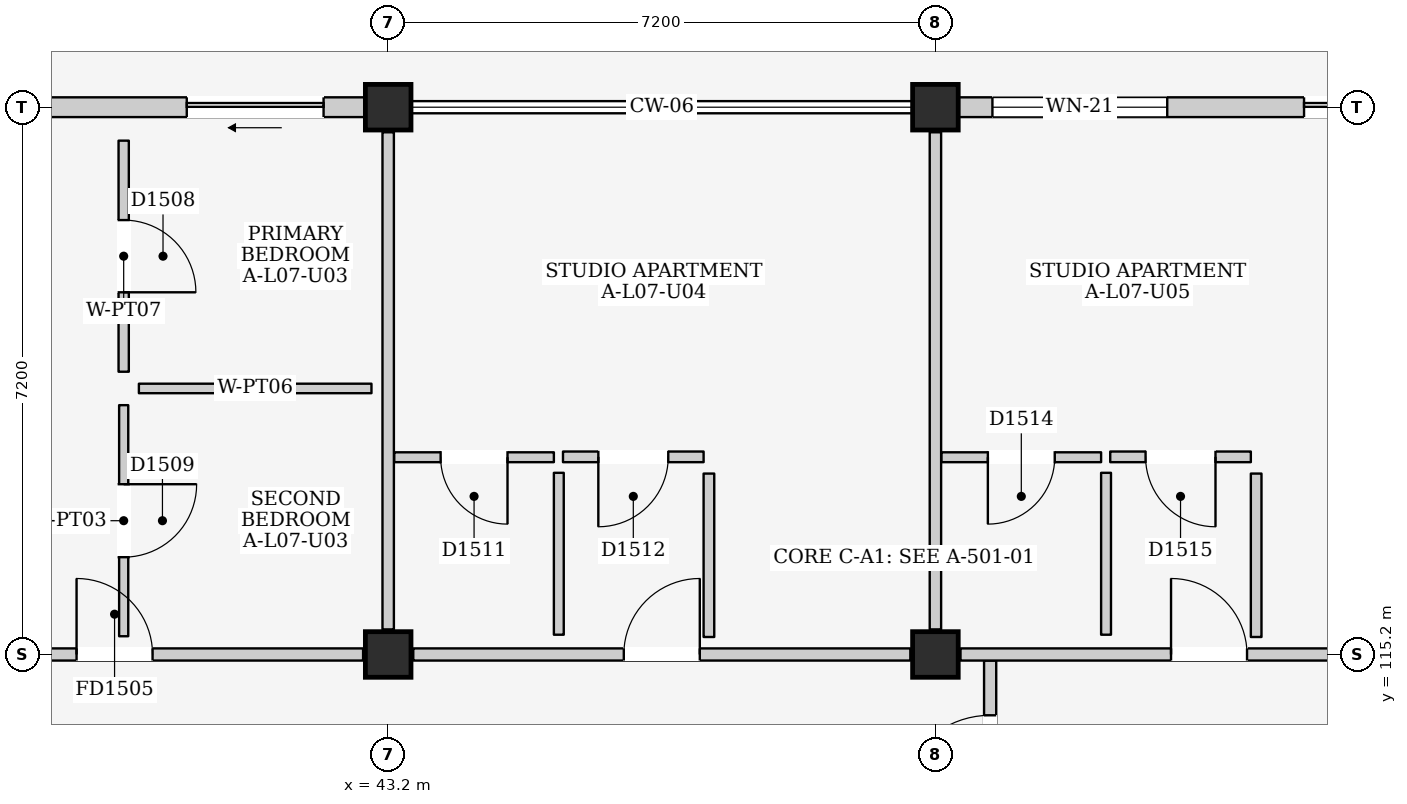
"""IFC4 building model, lengths in metres.
Left out: names, types, materials, properties, quantities, classifications, styles, units other than length and angle.
Written with IfcOpenShell. Run it as: python <this file> out.ifc"""

import sys

from ifc_helpers import new_model, si_unit, direction, frame, frame_2d, origin, origin_2d, place, context, subcontext, project, spatial, rectangle, extrude, element, fill, save


model = new_model("IFC4")
c1 = context("Model", 3, precision=1e-05, world=origin(), true_north=direction((0.0, 1.0)))
c2 = subcontext(c1, "Body", "Model", "MODEL_VIEW")
j1 = project(units=[si_unit("LENGTHUNIT", "METRE"), si_unit("PLANEANGLEUNIT", "RADIAN")], contexts=[c1])
p1 = place(None, origin())
s1 = spatial("IfcSite", under=j1, at=p1, CompositionType="ELEMENT")
p2 = place(p1, origin())
s2 = spatial("IfcBuilding", under=s1, at=p2, CompositionType="ELEMENT")
p3 = place(p2, frame((0.0, 0.0, 25.1)))
s3 = spatial("IfcBuildingStorey", under=s2, at=p3, CompositionType="ELEMENT", Elevation=25.1)
for number, where, z_axis, x_axis in (
    (1, (43.2, 115.2, 0.0), (0.0, 0.0, 1.0), (1.0, 0.0, 0.0)),
    (2, (43.2, 122.4, 0.0), (0.0, 0.0, 1.0), (1.0, 0.0, 0.0)),
    (3, (50.4, 115.2, 0.0), (0.0, 0.0, 1.0), (1.0, 0.0, 0.0)),
    (4, (50.4, 122.4, 0.0), (0.0, 0.0, 1.0), (1.0, 0.0, 0.0)),
):
    element("IfcColumn", number, at=place(p3, frame(where, z_axis=z_axis, x_axis=x_axis)), inside=s3, PredefinedType="COLUMN", context=c2, shape_type="SweptSolid", body=[
        extrude(rectangle(XDim=0.6, YDim=0.6, at=origin_2d()), origin(), (0.0, 0.0, 1.0), 3.2),
    ])
p4 = place(p3, frame((36.3, 122.4, 0.0), z_axis=(0.0, 0.0, 1.0), x_axis=(1.0, 0.0, 0.0)))
e5 = element("IfcWall", 5, at=p4, inside=s3, PredefinedType="ELEMENTEDWALL", context=c2, shape_type="SweptSolid", body=[
    extrude(rectangle(XDim=6.6, YDim=0.26, at=frame_2d((3.3, 0.0))), origin(), (0.0, 0.0, 1.0), 2.525),
])
p5 = place(p4, frame((4.25, 0.0, 0.0)))
e6 = element("IfcOpeningElement", 6, at=p5, cuts=e5, PredefinedType="OPENING", context=c2, shape_type="SweptSolid", body=[
    extrude(rectangle(XDim=1.8, YDim=2.12, at=frame_2d((0.9, 1.06))), frame((0.0, 0.145, 0.0), z_axis=(0.0, -1.0, 0.0), x_axis=(1.0, 0.0, 0.0)), (0.0, 0.0, 1.0), 0.29),
])
p6 = place(p4, frame((0.45, 0.0, 0.9)))
e7 = element("IfcOpeningElement", 7, at=p6, cuts=e5, PredefinedType="OPENING", context=c2, shape_type="SweptSolid", body=[
    extrude(rectangle(XDim=1.65, YDim=1.35, at=frame_2d((0.825, 0.675))), frame((0.0, 0.145, 0.0), z_axis=(0.0, -1.0, 0.0), x_axis=(1.0, 0.0, 0.0)), (0.0, 0.0, 1.0), 0.29),
])
p7 = place(p3, frame((50.7, 122.4, 0.0), z_axis=(0.0, 0.0, 1.0), x_axis=(1.0, 0.0, 0.0)))
e8 = element("IfcWall", 8, at=p7, inside=s3, PredefinedType="ELEMENTEDWALL", context=c2, shape_type="SweptSolid", body=[
    extrude(rectangle(XDim=6.6, YDim=0.26, at=frame_2d((3.3, 0.0))), origin(), (0.0, 0.0, 1.0), 2.525),
])
p8 = place(p7, frame((4.55, 0.0, 0.0)))
e9 = element("IfcOpeningElement", 9, at=p8, cuts=e8, PredefinedType="OPENING", context=c2, shape_type="SweptSolid", body=[
    extrude(rectangle(XDim=1.5, YDim=2.12, at=frame_2d((0.75, 1.06))), frame((0.0, 0.145, 0.0), z_axis=(0.0, -1.0, 0.0), x_axis=(1.0, 0.0, 0.0)), (0.0, 0.0, 1.0), 0.29),
])
p9 = place(p7, frame((0.45, 0.0, 0.815)))
e10 = element("IfcOpeningElement", 10, at=p9, cuts=e8, PredefinedType="OPENING", context=c2, shape_type="SweptSolid", body=[
    extrude(rectangle(XDim=2.3, YDim=1.6, at=frame_2d((1.15, 0.8))), frame((0.0, 0.145, 0.0), z_axis=(0.0, -1.0, 0.0), x_axis=(1.0, 0.0, 0.0)), (0.0, 0.0, 1.0), 0.29),
])
p10 = place(p3, frame((51.12, 111.1, 0.0), z_axis=(0.0, 0.0, 1.0), x_axis=(0.0, 1.0, 0.0)))
e11 = element("IfcWall", 11, at=p10, inside=s3, PredefinedType="PARTITIONING", context=c2, shape_type="SweptSolid", body=[
    extrude(rectangle(XDim=4.02, YDim=0.16, at=frame_2d((2.01, 0.0))), origin(), (0.0, 0.0, 1.0), 2.99),
])
p11 = place(p10, frame((2.1, 0.0, 0.0)))
e12 = element("IfcOpeningElement", 12, at=p11, cuts=e11, PredefinedType="OPENING", context=c2, shape_type="SweptSolid", body=[
    extrude(rectangle(XDim=1.2, YDim=2.2, at=frame_2d((0.6, 1.1))), frame((0.0, 0.095, 0.0), z_axis=(0.0, -1.0, 0.0), x_axis=(1.0, 0.0, 0.0)), (0.0, 0.0, 1.0), 0.19),
])
p12 = place(p3, frame((36.33, 115.2, 0.0), z_axis=(0.0, 0.0, 1.0), x_axis=(1.0, 0.0, 0.0)))
e13 = element("IfcWall", 13, at=p12, inside=s3, PredefinedType="PARTITIONING", context=c2, shape_type="SweptSolid", body=[
    extrude(rectangle(XDim=6.54, YDim=0.16, at=frame_2d((3.27, 0.0))), origin(), (0.0, 0.0, 1.0), 2.325),
])
p13 = place(p12, frame((2.77, 0.0, 0.0)))
e14 = element("IfcOpeningElement", 14, at=p13, cuts=e13, PredefinedType="OPENING", context=c2, shape_type="SweptSolid", body=[
    extrude(rectangle(XDim=1.0, YDim=2.15, at=frame_2d((0.5, 1.075))), frame((0.0, 0.095, 0.0), z_axis=(0.0, -1.0, 0.0), x_axis=(1.0, 0.0, 0.0)), (0.0, 0.0, 1.0), 0.19),
])
p14 = place(p3, frame((43.2, 115.53, 0.0), z_axis=(0.0, 0.0, 1.0), x_axis=(0.0, 1.0, 0.0)))
e15 = element("IfcWall", 15, at=p14, inside=s3, PredefinedType="PARTITIONING", context=c2, shape_type="SweptSolid", body=[
    extrude(rectangle(XDim=6.54, YDim=0.15, at=frame_2d((3.27, 0.0))), origin(), (0.0, 0.0, 1.0), 2.475),
])
p15 = place(p3, frame((39.72, 118.92, 0.0), z_axis=(0.0, 0.0, 1.0), x_axis=(0.0, 1.0, 0.0)))
e16 = element("IfcWall", 16, at=p15, inside=s3, PredefinedType="PARTITIONING", context=c2, shape_type="SweptSolid", body=[
    extrude(rectangle(XDim=3.04, YDim=0.135, at=frame_2d((1.52, 0.0))), origin(), (0.0, 0.0, 1.0), 2.99),
])
p16 = place(p15, frame((1.045, 0.0, 0.0)))
e17 = element("IfcOpeningElement", 17, at=p16, cuts=e16, PredefinedType="OPENING", context=c2, shape_type="SweptSolid", body=[
    extrude(rectangle(XDim=0.95, YDim=2.15, at=frame_2d((0.475, 1.075))), frame((0.0, 0.083, 0.0), z_axis=(0.0, -1.0, 0.0), x_axis=(1.0, 0.0, 0.0)), (0.0, 0.0, 1.0), 0.165),
])
p17 = place(p3, frame((39.92, 118.7, 0.0), z_axis=(0.0, 0.0, 1.0), x_axis=(1.0, 0.0, 0.0)))
e18 = element("IfcWall", 18, at=p17, inside=s3, PredefinedType="PARTITIONING", context=c2, shape_type="SweptSolid", body=[
    extrude(rectangle(XDim=3.06, YDim=0.125, at=frame_2d((1.53, 0.0))), origin(), (0.0, 0.0, 1.0), 2.99),
])
p18 = place(p3, frame((39.72, 115.44, 0.0), z_axis=(0.0, 0.0, 1.0), x_axis=(0.0, 1.0, 0.0)))
e19 = element("IfcWall", 19, at=p18, inside=s3, PredefinedType="PARTITIONING", context=c2, shape_type="SweptSolid", body=[
    extrude(rectangle(XDim=3.04, YDim=0.12, at=frame_2d((1.52, 0.0))), origin(), (0.0, 0.0, 1.0), 2.99),
])
p19 = place(p18, frame((1.04, 0.0, 0.0)))
e20 = element("IfcOpeningElement", 20, at=p19, cuts=e19, PredefinedType="OPENING", context=c2, shape_type="SweptSolid", body=[
    extrude(rectangle(XDim=0.96, YDim=2.15, at=frame_2d((0.48, 1.075))), frame((0.0, 0.075, 0.0), z_axis=(0.0, -1.0, 0.0), x_axis=(1.0, 0.0, 0.0)), (0.0, 0.0, 1.0), 0.15),
])
p20 = place(p3, frame((43.53, 115.2, 0.0), z_axis=(0.0, 0.0, 1.0), x_axis=(1.0, 0.0, 0.0)))
e21 = element("IfcWall", 21, at=p20, inside=s3, PredefinedType="PARTITIONING", context=c2, shape_type="SweptSolid", body=[
    extrude(rectangle(XDim=6.54, YDim=0.16, at=frame_2d((3.27, 0.0))), origin(), (0.0, 0.0, 1.0), 2.325),
])
p21 = place(p20, frame((2.77, 0.0, 0.0)))
e22 = element("IfcOpeningElement", 22, at=p21, cuts=e21, PredefinedType="OPENING", context=c2, shape_type="SweptSolid", body=[
    extrude(rectangle(XDim=1.0, YDim=2.15, at=frame_2d((0.5, 1.075))), frame((0.0, 0.095, 0.0), z_axis=(0.0, -1.0, 0.0), x_axis=(1.0, 0.0, 0.0)), (0.0, 0.0, 1.0), 0.19),
])
p22 = place(p3, frame((50.4, 115.53, 0.0), z_axis=(0.0, 0.0, 1.0), x_axis=(0.0, 1.0, 0.0)))
e23 = element("IfcWall", 23, at=p22, inside=s3, PredefinedType="PARTITIONING", context=c2, shape_type="SweptSolid", body=[
    extrude(rectangle(XDim=6.54, YDim=0.15, at=frame_2d((3.27, 0.0))), origin(), (0.0, 0.0, 1.0), 2.475),
])
p23 = place(p3, frame((43.28, 117.795, 0.0), z_axis=(0.0, 0.0, 1.0), x_axis=(1.0, 0.0, 0.0)))
e24 = element("IfcWall", 24, at=p23, inside=s3, PredefinedType="PARTITIONING", context=c2, shape_type="SweptSolid", body=[
    extrude(rectangle(XDim=2.1, YDim=0.13, at=frame_2d((1.05, 0.0))), origin(), (0.0, 0.0, 1.0), 2.99),
])
p24 = place(p23, frame((0.61, 0.0, 0.0)))
e25 = element("IfcOpeningElement", 25, at=p24, cuts=e24, PredefinedType="OPENING", context=c2, shape_type="SweptSolid", body=[
    extrude(rectangle(XDim=0.88, YDim=2.1, at=frame_2d((0.44, 1.05))), frame((0.0, 0.08, 0.0), z_axis=(0.0, -1.0, 0.0), x_axis=(1.0, 0.0, 0.0)), (0.0, 0.0, 1.0), 0.16),
])
p25 = place(p3, frame((45.445, 115.46, 0.0), z_axis=(0.0, 0.0, 1.0), x_axis=(0.0, 1.0, 0.0)))
e26 = element("IfcWall", 26, at=p25, inside=s3, PredefinedType="PARTITIONING", context=c2, shape_type="SweptSolid", body=[
    extrude(rectangle(XDim=2.13, YDim=0.13, at=frame_2d((1.065, 0.0))), origin(), (0.0, 0.0, 1.0), 2.99),
])
p26 = place(p3, frame((45.5, 117.8, 0.0), z_axis=(0.0, 0.0, 1.0), x_axis=(1.0, 0.0, 0.0)))
e27 = element("IfcWall", 27, at=p26, inside=s3, PredefinedType="PARTITIONING", context=c2, shape_type="SweptSolid", body=[
    extrude(rectangle(XDim=1.85, YDim=0.14, at=frame_2d((0.925, 0.0))), origin(), (0.0, 0.0, 1.0), 2.99),
])
p27 = place(p26, frame((0.465, 0.0, 0.0)))
e28 = element("IfcOpeningElement", 28, at=p27, cuts=e27, PredefinedType="OPENING", context=c2, shape_type="SweptSolid", body=[
    extrude(rectangle(XDim=0.92, YDim=2.1, at=frame_2d((0.46, 1.05))), frame((0.0, 0.085, 0.0), z_axis=(0.0, -1.0, 0.0), x_axis=(1.0, 0.0, 0.0)), (0.0, 0.0, 1.0), 0.17),
])
p28 = place(p3, frame((47.42, 115.43, 0.0), z_axis=(0.0, 0.0, 1.0), x_axis=(0.0, 1.0, 0.0)))
e29 = element("IfcWall", 29, at=p28, inside=s3, PredefinedType="PARTITIONING", context=c2, shape_type="SweptSolid", body=[
    extrude(rectangle(XDim=2.15, YDim=0.14, at=frame_2d((1.075, 0.0))), origin(), (0.0, 0.0, 1.0), 2.99),
])
p29 = place(p3, frame((50.73, 115.2, 0.0), z_axis=(0.0, 0.0, 1.0), x_axis=(1.0, 0.0, 0.0)))
e30 = element("IfcWall", 30, at=p29, inside=s3, PredefinedType="PARTITIONING", context=c2, shape_type="SweptSolid", body=[
    extrude(rectangle(XDim=6.54, YDim=0.16, at=frame_2d((3.27, 0.0))), origin(), (0.0, 0.0, 1.0), 2.325),
])
p30 = place(p29, frame((2.77, 0.0, 0.0)))
e31 = element("IfcOpeningElement", 31, at=p30, cuts=e30, PredefinedType="OPENING", context=c2, shape_type="SweptSolid", body=[
    extrude(rectangle(XDim=1.0, YDim=2.15, at=frame_2d((0.5, 1.075))), frame((0.0, 0.095, 0.0), z_axis=(0.0, -1.0, 0.0), x_axis=(1.0, 0.0, 0.0)), (0.0, 0.0, 1.0), 0.19),
])
p31 = place(p3, frame((50.48, 117.795, 0.0), z_axis=(0.0, 0.0, 1.0), x_axis=(1.0, 0.0, 0.0)))
e32 = element("IfcWall", 32, at=p31, inside=s3, PredefinedType="PARTITIONING", context=c2, shape_type="SweptSolid", body=[
    extrude(rectangle(XDim=2.1, YDim=0.13, at=frame_2d((1.05, 0.0))), origin(), (0.0, 0.0, 1.0), 2.99),
])
p32 = place(p31, frame((0.61, 0.0, 0.0)))
e33 = element("IfcOpeningElement", 33, at=p32, cuts=e32, PredefinedType="OPENING", context=c2, shape_type="SweptSolid", body=[
    extrude(rectangle(XDim=0.88, YDim=2.1, at=frame_2d((0.44, 1.05))), frame((0.0, 0.08, 0.0), z_axis=(0.0, -1.0, 0.0), x_axis=(1.0, 0.0, 0.0)), (0.0, 0.0, 1.0), 0.16),
])
p33 = place(p3, frame((52.645, 115.46, 0.0), z_axis=(0.0, 0.0, 1.0), x_axis=(0.0, 1.0, 0.0)))
e34 = element("IfcWall", 34, at=p33, inside=s3, PredefinedType="PARTITIONING", context=c2, shape_type="SweptSolid", body=[
    extrude(rectangle(XDim=2.13, YDim=0.13, at=frame_2d((1.065, 0.0))), origin(), (0.0, 0.0, 1.0), 2.99),
])
p34 = place(p3, frame((52.7, 117.8, 0.0), z_axis=(0.0, 0.0, 1.0), x_axis=(1.0, 0.0, 0.0)))
e35 = element("IfcWall", 35, at=p34, inside=s3, PredefinedType="PARTITIONING", context=c2, shape_type="SweptSolid", body=[
    extrude(rectangle(XDim=1.85, YDim=0.14, at=frame_2d((0.925, 0.0))), origin(), (0.0, 0.0, 1.0), 2.99),
])
p35 = place(p34, frame((0.465, 0.0, 0.0)))
e36 = element("IfcOpeningElement", 36, at=p35, cuts=e35, PredefinedType="OPENING", context=c2, shape_type="SweptSolid", body=[
    extrude(rectangle(XDim=0.92, YDim=2.1, at=frame_2d((0.46, 1.05))), frame((0.0, 0.085, 0.0), z_axis=(0.0, -1.0, 0.0), x_axis=(1.0, 0.0, 0.0)), (0.0, 0.0, 1.0), 0.17),
])
p36 = place(p3, frame((54.62, 115.43, 0.0), z_axis=(0.0, 0.0, 1.0), x_axis=(0.0, 1.0, 0.0)))
e37 = element("IfcWall", 37, at=p36, inside=s3, PredefinedType="PARTITIONING", context=c2, shape_type="SweptSolid", body=[
    extrude(rectangle(XDim=2.15, YDim=0.14, at=frame_2d((1.075, 0.0))), origin(), (0.0, 0.0, 1.0), 2.99),
])
p37 = place(p5, frame((1.8, 0.0, 0.0), z_axis=(0.0, 0.0, 1.0), x_axis=(-1.0, 0.0, 0.0)))
e38 = element("IfcDoor", 38, at=p37, inside=s3, OperationType="SLIDING_TO_LEFT", PredefinedType="DOOR", context=c2, shape_type="SweptSolid", body=[
    extrude(rectangle(XDim=1.8, YDim=2.12, at=frame_2d((0.9, 1.06))), frame((0.0, 0.025, 0.0), z_axis=(0.0, -1.0, 0.0), x_axis=(1.0, 0.0, 0.0)), (0.0, 0.0, 1.0), 0.05),
])
fill(e6, e38)
p38 = place(p8, frame((1.5, 0.0, 0.0), z_axis=(0.0, 0.0, 1.0), x_axis=(-1.0, 0.0, 0.0)))
e39 = element("IfcDoor", 39, at=p38, inside=s3, OperationType="SLIDING_TO_LEFT", PredefinedType="DOOR", context=c2, shape_type="SweptSolid", body=[
    extrude(rectangle(XDim=1.5, YDim=2.12, at=frame_2d((0.75, 1.06))), frame((0.0, 0.025, 0.0), z_axis=(0.0, -1.0, 0.0), x_axis=(1.0, 0.0, 0.0)), (0.0, 0.0, 1.0), 0.05),
])
fill(e9, e39)
p39 = place(p9, origin())
e40 = element("IfcWindow", 40, at=p39, inside=s3, PartitioningType="TRIPLE_PANEL_VERTICAL", PredefinedType="WINDOW", context=c2, shape_type="SweptSolid", body=[
    extrude(rectangle(XDim=2.3, YDim=1.6, at=frame_2d((1.15, 0.8))), frame((0.0, 0.03, 0.0), z_axis=(0.0, -1.0, 0.0), x_axis=(1.0, 0.0, 0.0)), (0.0, 0.0, 1.0), 0.06),
])
fill(e10, e40)
p40 = place(p11, origin())
e41 = element("IfcDoor", 41, at=p40, inside=s3, OperationType="SINGLE_SWING_LEFT", PredefinedType="DOOR", context=c2, shape_type="SweptSolid", body=[
    extrude(rectangle(XDim=1.2, YDim=2.2, at=frame_2d((0.6, 1.1))), frame((0.0, 0.025, 0.0), z_axis=(0.0, -1.0, 0.0), x_axis=(1.0, 0.0, 0.0)), (0.0, 0.0, 1.0), 0.05),
])
fill(e12, e41)
p41 = place(p13, origin())
e42 = element("IfcDoor", 42, at=p41, inside=s3, OperationType="SINGLE_SWING_LEFT", PredefinedType="DOOR", context=c2, shape_type="SweptSolid", body=[
    extrude(rectangle(XDim=1.0, YDim=2.15, at=frame_2d((0.5, 1.075))), frame((0.0, 0.025, 0.0), z_axis=(0.0, -1.0, 0.0), x_axis=(1.0, 0.0, 0.0)), (0.0, 0.0, 1.0), 0.05),
])
fill(e14, e42)
p42 = place(p16, frame((0.95, 0.0, 0.0), z_axis=(0.0, 0.0, 1.0), x_axis=(-1.0, 0.0, 0.0)))
e43 = element("IfcDoor", 43, at=p42, inside=s3, OperationType="SINGLE_SWING_RIGHT", PredefinedType="DOOR", context=c2, shape_type="SweptSolid", body=[
    extrude(rectangle(XDim=0.95, YDim=2.15, at=frame_2d((0.475, 1.075))), frame((0.0, 0.025, 0.0), z_axis=(0.0, -1.0, 0.0), x_axis=(1.0, 0.0, 0.0)), (0.0, 0.0, 1.0), 0.05),
])
fill(e17, e43)
p43 = place(p19, frame((0.96, 0.0, 0.0), z_axis=(0.0, 0.0, 1.0), x_axis=(-1.0, 0.0, 0.0)))
e44 = element("IfcDoor", 44, at=p43, inside=s3, OperationType="SINGLE_SWING_LEFT", PredefinedType="DOOR", context=c2, shape_type="SweptSolid", body=[
    extrude(rectangle(XDim=0.96, YDim=2.15, at=frame_2d((0.48, 1.075))), frame((0.0, 0.025, 0.0), z_axis=(0.0, -1.0, 0.0), x_axis=(1.0, 0.0, 0.0)), (0.0, 0.0, 1.0), 0.05),
])
fill(e20, e44)
p44 = place(p21, origin())
e45 = element("IfcDoor", 45, at=p44, inside=s3, OperationType="SINGLE_SWING_RIGHT", PredefinedType="DOOR", context=c2, shape_type="SweptSolid", body=[
    extrude(rectangle(XDim=1.0, YDim=2.15, at=frame_2d((0.5, 1.075))), frame((0.0, 0.025, 0.0), z_axis=(0.0, -1.0, 0.0), x_axis=(1.0, 0.0, 0.0)), (0.0, 0.0, 1.0), 0.05),
])
fill(e22, e45)
p45 = place(p24, frame((0.88, 0.0, 0.0), z_axis=(0.0, 0.0, 1.0), x_axis=(-1.0, 0.0, 0.0)))
e46 = element("IfcDoor", 46, at=p45, inside=s3, OperationType="SINGLE_SWING_LEFT", PredefinedType="DOOR", context=c2, shape_type="SweptSolid", body=[
    extrude(rectangle(XDim=0.88, YDim=2.1, at=frame_2d((0.44, 1.05))), frame((0.0, 0.025, 0.0), z_axis=(0.0, -1.0, 0.0), x_axis=(1.0, 0.0, 0.0)), (0.0, 0.0, 1.0), 0.05),
])
fill(e25, e46)
p46 = place(p27, frame((0.92, 0.0, 0.0), z_axis=(0.0, 0.0, 1.0), x_axis=(-1.0, 0.0, 0.0)))
e47 = element("IfcDoor", 47, at=p46, inside=s3, OperationType="SINGLE_SWING_RIGHT", PredefinedType="DOOR", context=c2, shape_type="SweptSolid", body=[
    extrude(rectangle(XDim=0.92, YDim=2.1, at=frame_2d((0.46, 1.05))), frame((0.0, 0.025, 0.0), z_axis=(0.0, -1.0, 0.0), x_axis=(1.0, 0.0, 0.0)), (0.0, 0.0, 1.0), 0.05),
])
fill(e28, e47)
p47 = place(p30, origin())
e48 = element("IfcDoor", 48, at=p47, inside=s3, OperationType="SINGLE_SWING_LEFT", PredefinedType="DOOR", context=c2, shape_type="SweptSolid", body=[
    extrude(rectangle(XDim=1.0, YDim=2.15, at=frame_2d((0.5, 1.075))), frame((0.0, 0.025, 0.0), z_axis=(0.0, -1.0, 0.0), x_axis=(1.0, 0.0, 0.0)), (0.0, 0.0, 1.0), 0.05),
])
fill(e31, e48)
p48 = place(p32, frame((0.88, 0.0, 0.0), z_axis=(0.0, 0.0, 1.0), x_axis=(-1.0, 0.0, 0.0)))
e49 = element("IfcDoor", 49, at=p48, inside=s3, OperationType="SINGLE_SWING_RIGHT", PredefinedType="DOOR", context=c2, shape_type="SweptSolid", body=[
    extrude(rectangle(XDim=0.88, YDim=2.1, at=frame_2d((0.44, 1.05))), frame((0.0, 0.025, 0.0), z_axis=(0.0, -1.0, 0.0), x_axis=(1.0, 0.0, 0.0)), (0.0, 0.0, 1.0), 0.05),
])
fill(e33, e49)
p49 = place(p35, frame((0.92, 0.0, 0.0), z_axis=(0.0, 0.0, 1.0), x_axis=(-1.0, 0.0, 0.0)))
e50 = element("IfcDoor", 50, at=p49, inside=s3, OperationType="SINGLE_SWING_LEFT", PredefinedType="DOOR", context=c2, shape_type="SweptSolid", body=[
    extrude(rectangle(XDim=0.92, YDim=2.1, at=frame_2d((0.46, 1.05))), frame((0.0, 0.025, 0.0), z_axis=(0.0, -1.0, 0.0), x_axis=(1.0, 0.0, 0.0)), (0.0, 0.0, 1.0), 0.05),
])
fill(e36, e50)
save(model, sys.argv[1])
